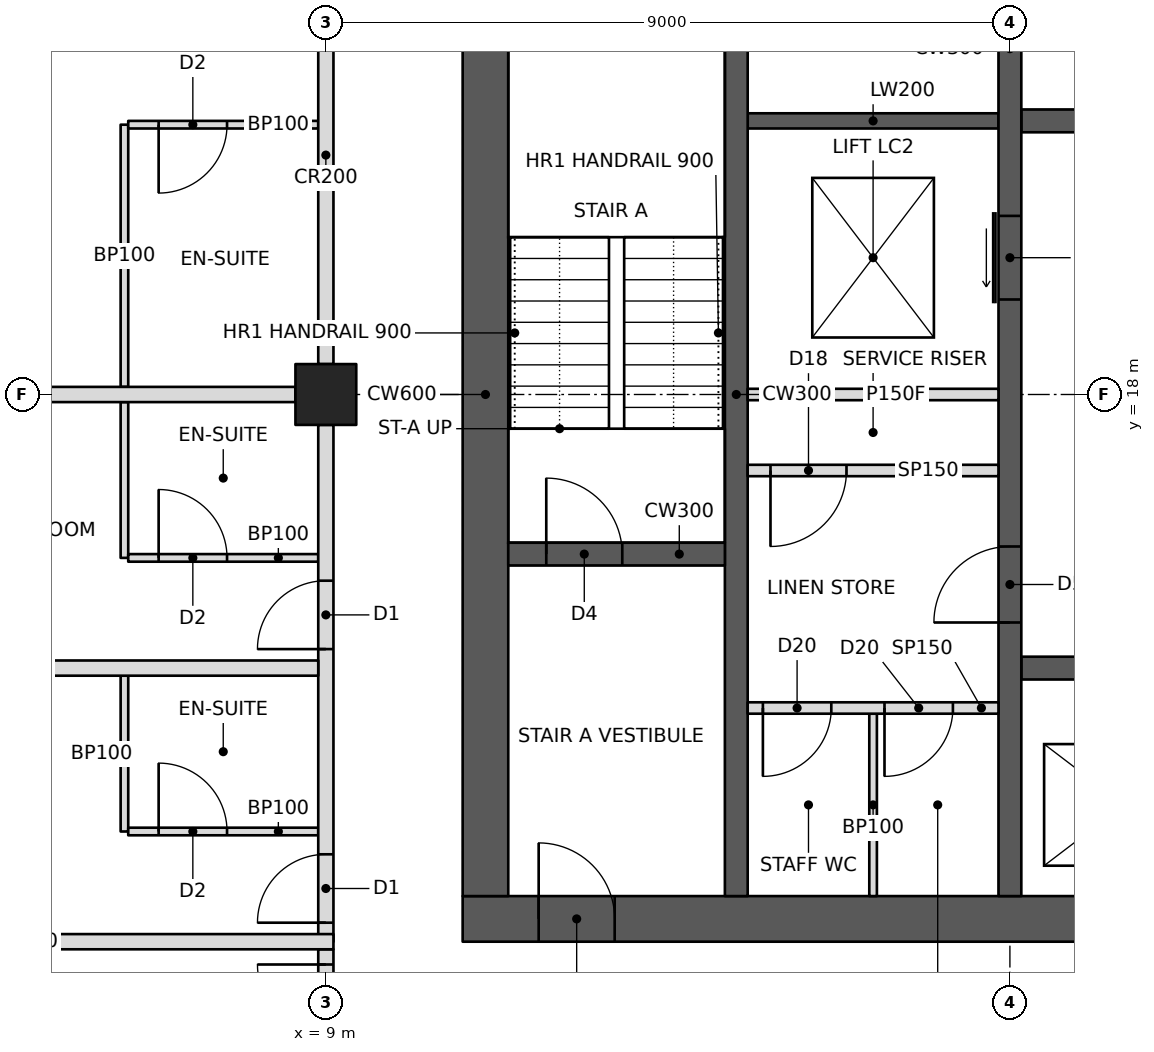
"""IFC4 building model, lengths in metres.
Left out: names, types, materials, properties, quantities, classifications, styles, units other than length and angle.
Written with IfcOpenShell. Run it as: python <this file> out.ifc"""

import sys

from ifc_helpers import new_model, si_unit, direction, frame, frame_2d, origin, origin_2d, place, context, subcontext, project, spatial, rectangle, hollow_rectangle, extrude, element, fill, save


model = new_model("IFC4")
c1 = context("Model", 3, precision=1e-05, world=origin(), true_north=direction((0.0, 1.0)))
c2 = subcontext(c1, "Body", "Model", "MODEL_VIEW")
j1 = project(units=[si_unit("LENGTHUNIT", "METRE"), si_unit("PLANEANGLEUNIT", "RADIAN")], contexts=[c1])
p1 = place(None, origin())
s1 = spatial("IfcSite", under=j1, at=p1, CompositionType="ELEMENT")
p2 = place(p1, origin())
s2 = spatial("IfcBuilding", under=s1, at=p2, CompositionType="ELEMENT")
p3 = place(p2, frame((0.0, 0.0, 170.6)))
s3 = spatial("IfcBuildingStorey", under=s2, at=p3, CompositionType="ELEMENT", Elevation=170.6)
p4 = place(p3, frame((9.0, 18.0, 0.0), z_axis=(0.0, 0.0, 1.0), x_axis=(1.0, 0.0, 0.0)))
e1 = element("IfcColumn", 1, at=p4, inside=s3, PredefinedType="COLUMN", context=c2, shape_type="SweptSolid", body=[
    extrude(hollow_rectangle(XDim=0.8, YDim=0.8, WallThickness=0.06, at=origin_2d()), origin(), (0.0, 0.0, 1.0), 3.4),
])
p5 = place(p3, frame((10.8, 11.1, 0.0), z_axis=(0.0, 0.0, 1.0), x_axis=(1.0, 0.0, 0.0)))
e2 = element("IfcWall", 2, at=p5, inside=s3, PredefinedType="SHEAR", context=c2, shape_type="SweptSolid", body=[
    extrude(rectangle(XDim=23.4, YDim=0.6, at=frame_2d((11.7, 0.0))), origin(), (0.0, 0.0, 1.0), 3.4),
])
p6 = place(p5, frame((1.0, 0.0, 0.0)))
e3 = element("IfcOpeningElement", 3, at=p6, cuts=e2, PredefinedType="OPENING", context=c2, shape_type="SweptSolid", body=[
    extrude(rectangle(XDim=1.0, YDim=2.1, at=frame_2d((0.5, 1.05))), frame((0.0, 0.31, 0.0), z_axis=(0.0, -1.0, 0.0), x_axis=(1.0, 0.0, 0.0)), (0.0, 0.0, 1.0), 0.62),
])
p7 = place(p5, frame((17.2, 0.0, 0.0)))
e4 = element("IfcOpeningElement", 4, at=p7, cuts=e2, PredefinedType="OPENING", context=c2, shape_type="SweptSolid", body=[
    extrude(rectangle(XDim=1.8, YDim=2.1, at=frame_2d((0.9, 1.05))), frame((0.0, 0.31, 0.0), z_axis=(0.0, -1.0, 0.0), x_axis=(1.0, 0.0, 0.0)), (0.0, 0.0, 1.0), 0.62),
])
p8 = place(p3, frame((11.1, 11.4, 0.0), z_axis=(0.0, 0.0, 1.0), x_axis=(0.0, 1.0, 0.0)))
e5 = element("IfcWall", 5, at=p8, inside=s3, PredefinedType="SHEAR", context=c2, shape_type="SweptSolid", body=[
    extrude(rectangle(XDim=13.2, YDim=0.6, at=frame_2d((6.6, 0.0))), origin(), (0.0, 0.0, 1.0), 3.4),
])
p9 = place(p3, frame((14.4, 11.4, 0.0), z_axis=(0.0, 0.0, 1.0), x_axis=(0.0, 1.0, 0.0)))
e6 = element("IfcWall", 6, at=p9, inside=s3, PredefinedType="SHEAR", context=c2, shape_type="SweptSolid", body=[
    extrude(rectangle(XDim=13.2, YDim=0.3, at=frame_2d((6.6, 0.0))), origin(), (0.0, 0.0, 1.0), 3.4),
])
p10 = place(p3, frame((11.4, 15.9, 0.0), z_axis=(0.0, 0.0, 1.0), x_axis=(1.0, 0.0, 0.0)))
e7 = element("IfcWall", 7, at=p10, inside=s3, PredefinedType="SHEAR", context=c2, shape_type="SweptSolid", body=[
    extrude(rectangle(XDim=2.85, YDim=0.3, at=frame_2d((1.425, 0.0))), origin(), (0.0, 0.0, 1.0), 3.4),
])
p11 = place(p10, frame((0.5, 0.0, 0.0)))
e8 = element("IfcOpeningElement", 8, at=p11, cuts=e7, PredefinedType="OPENING", context=c2, shape_type="SweptSolid", body=[
    extrude(rectangle(XDim=1.0, YDim=2.1, at=frame_2d((0.5, 1.05))), frame((0.0, 0.16, 0.0), z_axis=(0.0, -1.0, 0.0), x_axis=(1.0, 0.0, 0.0)), (0.0, 0.0, 1.0), 0.32),
])
p12 = place(p3, frame((18.0, 11.4, 0.0), z_axis=(0.0, 0.0, 1.0), x_axis=(0.0, 1.0, 0.0)))
e9 = element("IfcWall", 9, at=p12, inside=s3, PredefinedType="SHEAR", context=c2, shape_type="SweptSolid", body=[
    extrude(rectangle(XDim=13.2, YDim=0.3, at=frame_2d((6.6, 0.0))), origin(), (0.0, 0.0, 1.0), 3.4),
])
p13 = place(p12, frame((3.6, 0.0, 0.0)))
e10 = element("IfcOpeningElement", 10, at=p13, cuts=e9, PredefinedType="OPENING", context=c2, shape_type="SweptSolid", body=[
    extrude(rectangle(XDim=1.0, YDim=2.1, at=frame_2d((0.5, 1.05))), frame((0.0, 0.16, 0.0), z_axis=(0.0, -1.0, 0.0), x_axis=(1.0, 0.0, 0.0)), (0.0, 0.0, 1.0), 0.32),
])
p14 = place(p12, frame((7.85, 0.0, 0.0)))
e11 = element("IfcOpeningElement", 11, at=p14, cuts=e9, PredefinedType="OPENING", context=c2, shape_type="SweptSolid", body=[
    extrude(rectangle(XDim=1.1, YDim=2.1, at=frame_2d((0.55, 1.05))), frame((0.0, 0.16, 0.0), z_axis=(0.0, -1.0, 0.0), x_axis=(1.0, 0.0, 0.0)), (0.0, 0.0, 1.0), 0.32),
])
p15 = place(p3, frame((14.55, 18.0, 0.0), z_axis=(0.0, 0.0, 1.0), x_axis=(1.0, 0.0, 0.0)))
e12 = element("IfcWall", 12, at=p15, inside=s3, PredefinedType="PARTITIONING", context=c2, shape_type="SweptSolid", body=[
    extrude(rectangle(XDim=3.3, YDim=0.15, at=frame_2d((1.65, 0.0))), origin(), (0.0, 0.0, 1.0), 3.2),
])
p16 = place(p3, frame((18.15, 14.4, 0.0), z_axis=(0.0, 0.0, 1.0), x_axis=(1.0, 0.0, 0.0)))
e13 = element("IfcWall", 13, at=p16, inside=s3, PredefinedType="SHEAR", context=c2, shape_type="SweptSolid", body=[
    extrude(rectangle(XDim=9.0, YDim=0.3, at=frame_2d((4.5, 0.0))), origin(), (0.0, 0.0, 1.0), 3.4),
])
p17 = place(p16, frame((0.8, 0.0, 0.0)))
e14 = element("IfcOpeningElement", 14, at=p17, cuts=e13, PredefinedType="OPENING", context=c2, shape_type="SweptSolid", body=[
    extrude(rectangle(XDim=1.1, YDim=2.1, at=frame_2d((0.55, 1.05))), frame((0.0, 0.16, 0.0), z_axis=(0.0, -1.0, 0.0), x_axis=(1.0, 0.0, 0.0)), (0.0, 0.0, 1.0), 0.32),
])
p18 = place(p16, frame((6.75, 0.0, 0.0)))
e15 = element("IfcOpeningElement", 15, at=p18, cuts=e13, PredefinedType="OPENING", context=c2, shape_type="SweptSolid", body=[
    extrude(rectangle(XDim=1.2, YDim=2.1, at=frame_2d((0.6, 1.05))), frame((0.0, 0.16, 0.0), z_axis=(0.0, -1.0, 0.0), x_axis=(1.0, 0.0, 0.0)), (0.0, 0.0, 1.0), 0.32),
])
p19 = place(p16, frame((3.8, 0.0, 0.0)))
e16 = element("IfcOpeningElement", 16, at=p19, cuts=e13, PredefinedType="OPENING", context=c2, shape_type="SweptSolid", body=[
    extrude(rectangle(XDim=1.1, YDim=2.1, at=frame_2d((0.55, 1.05))), frame((0.0, 0.16, 0.0), z_axis=(0.0, -1.0, 0.0), x_axis=(1.0, 0.0, 0.0)), (0.0, 0.0, 1.0), 0.32),
])
p20 = place(p3, frame((18.15, 21.6, 0.0), z_axis=(0.0, 0.0, 1.0), x_axis=(1.0, 0.0, 0.0)))
e17 = element("IfcWall", 17, at=p20, inside=s3, PredefinedType="SHEAR", context=c2, shape_type="SweptSolid", body=[
    extrude(rectangle(XDim=9.0, YDim=0.3, at=frame_2d((4.5, 0.0))), origin(), (0.0, 0.0, 1.0), 3.4),
])
p21 = place(p20, frame((6.75, 0.0, 0.0)))
e18 = element("IfcOpeningElement", 18, at=p21, cuts=e17, PredefinedType="OPENING", context=c2, shape_type="SweptSolid", body=[
    extrude(rectangle(XDim=1.2, YDim=2.1, at=frame_2d((0.6, 1.05))), frame((0.0, 0.16, 0.0), z_axis=(0.0, -1.0, 0.0), x_axis=(1.0, 0.0, 0.0)), (0.0, 0.0, 1.0), 0.32),
])
p22 = place(p20, frame((0.8, 0.0, 0.0)))
e19 = element("IfcOpeningElement", 19, at=p22, cuts=e17, PredefinedType="OPENING", context=c2, shape_type="SweptSolid", body=[
    extrude(rectangle(XDim=1.1, YDim=2.1, at=frame_2d((0.55, 1.05))), frame((0.0, 0.16, 0.0), z_axis=(0.0, -1.0, 0.0), x_axis=(1.0, 0.0, 0.0)), (0.0, 0.0, 1.0), 0.32),
])
p23 = place(p20, frame((3.8, 0.0, 0.0)))
e20 = element("IfcOpeningElement", 20, at=p23, cuts=e17, PredefinedType="OPENING", context=c2, shape_type="SweptSolid", body=[
    extrude(rectangle(XDim=1.1, YDim=2.1, at=frame_2d((0.55, 1.05))), frame((0.0, 0.16, 0.0), z_axis=(0.0, -1.0, 0.0), x_axis=(1.0, 0.0, 0.0)), (0.0, 0.0, 1.0), 0.32),
])
p24 = place(p3, frame((14.55, 21.6, 0.0), z_axis=(0.0, 0.0, 1.0), x_axis=(1.0, 0.0, 0.0)))
e21 = element("IfcWall", 21, at=p24, inside=s3, PredefinedType="SHEAR", context=c2, shape_type="SweptSolid", body=[
    extrude(rectangle(XDim=3.3, YDim=0.2, at=frame_2d((1.65, 0.0))), origin(), (0.0, 0.0, 1.0), 3.4),
])
p25 = place(p3, frame((9.0, 10.8, 0.0), z_axis=(0.0, 0.0, 1.0), x_axis=(0.0, 1.0, 0.0)))
e22 = element("IfcWall", 22, at=p25, inside=s3, PredefinedType="PARTITIONING", context=c2, shape_type="SweptSolid", body=[
    extrude(rectangle(XDim=6.8, YDim=0.2, at=frame_2d((3.4, 0.0))), origin(), (0.0, 0.0, 1.0), 2.405),
])
p26 = place(p25, frame((0.25, 0.0, 0.0)))
e23 = element("IfcOpeningElement", 23, at=p26, cuts=e22, PredefinedType="OPENING", context=c2, shape_type="SweptSolid", body=[
    extrude(rectangle(XDim=0.9, YDim=2.1, at=frame_2d((0.45, 1.05))), frame((0.0, 0.11, 0.0), z_axis=(0.0, -1.0, 0.0), x_axis=(1.0, 0.0, 0.0)), (0.0, 0.0, 1.0), 0.22),
])
p27 = place(p25, frame((3.85, 0.0, 0.0)))
e24 = element("IfcOpeningElement", 24, at=p27, cuts=e22, PredefinedType="OPENING", context=c2, shape_type="SweptSolid", body=[
    extrude(rectangle(XDim=0.9, YDim=2.1, at=frame_2d((0.45, 1.05))), frame((0.0, 0.11, 0.0), z_axis=(0.0, -1.0, 0.0), x_axis=(1.0, 0.0, 0.0)), (0.0, 0.0, 1.0), 0.22),
])
p28 = place(p3, frame((9.0, 18.4, 0.0), z_axis=(0.0, 0.0, 1.0), x_axis=(0.0, 1.0, 0.0)))
e25 = element("IfcWall", 25, at=p28, inside=s3, PredefinedType="PARTITIONING", context=c2, shape_type="SweptSolid", body=[
    extrude(rectangle(XDim=8.2, YDim=0.2, at=frame_2d((4.1, 0.0))), origin(), (0.0, 0.0, 1.0), 2.405),
])
p29 = place(p28, frame((5.65, 0.0, 0.0)))
e26 = element("IfcOpeningElement", 26, at=p29, cuts=e25, PredefinedType="OPENING", context=c2, shape_type="SweptSolid", body=[
    extrude(rectangle(XDim=0.9, YDim=2.1, at=frame_2d((0.45, 1.05))), frame((0.0, 0.11, 0.0), z_axis=(0.0, -1.0, 0.0), x_axis=(1.0, 0.0, 0.0)), (0.0, 0.0, 1.0), 0.22),
])
p30 = place(p3, frame((1.0, 10.8, 0.0), z_axis=(0.0, 0.0, 1.0), x_axis=(1.0, 0.0, 0.0)))
e27 = element("IfcWall", 27, at=p30, inside=s3, PredefinedType="PARTITIONING", context=c2, shape_type="SweptSolid", body=[
    extrude(rectangle(XDim=8.1, YDim=0.2, at=frame_2d((4.05, 0.0))), origin(), (0.0, 0.0, 1.0), 2.404),
])
p31 = place(p3, frame((8.9, 14.4, 0.0), z_axis=(0.0, 0.0, 1.0), x_axis=(-1.0, 0.0, 0.0)))
e28 = element("IfcWall", 28, at=p31, inside=s3, PredefinedType="PARTITIONING", context=c2, shape_type="SweptSolid", body=[
    extrude(rectangle(XDim=7.9, YDim=0.2, at=frame_2d((3.95, 0.0))), origin(), (0.0, 0.0, 1.0), 2.404),
])
p32 = place(p3, frame((8.6, 18.0, 0.0), z_axis=(0.0, 0.0, 1.0), x_axis=(-1.0, 0.0, 0.0)))
e29 = element("IfcWall", 29, at=p32, inside=s3, PredefinedType="PARTITIONING", context=c2, shape_type="SweptSolid", body=[
    extrude(rectangle(XDim=7.6, YDim=0.2, at=frame_2d((3.8, 0.0))), origin(), (0.0, 0.0, 1.0), 2.405),
])
p33 = place(p3, frame((6.35, 12.25, 0.0), z_axis=(0.0, 0.0, 1.0), x_axis=(0.0, 1.0, 0.0)))
e30 = element("IfcWall", 30, at=p33, inside=s3, PredefinedType="PARTITIONING", context=c2, shape_type="SweptSolid", body=[
    extrude(rectangle(XDim=2.05, YDim=0.1, at=frame_2d((1.025, 0.0))), origin(), (0.0, 0.0, 1.0), 3.2),
])
p34 = place(p3, frame((8.9, 12.25, 0.0), z_axis=(0.0, 0.0, 1.0), x_axis=(-1.0, 0.0, 0.0)))
e31 = element("IfcWall", 31, at=p34, inside=s3, PredefinedType="PARTITIONING", context=c2, shape_type="SweptSolid", body=[
    extrude(rectangle(XDim=2.5, YDim=0.1, at=frame_2d((1.25, 0.0))), origin(), (0.0, 0.0, 1.0), 2.404),
])
p35 = place(p34, frame((1.2, 0.0, 0.0)))
e32 = element("IfcOpeningElement", 32, at=p35, cuts=e31, PredefinedType="OPENING", context=c2, shape_type="SweptSolid", body=[
    extrude(rectangle(XDim=0.9, YDim=2.1, at=frame_2d((0.45, 1.05))), frame((0.0, 0.06, 0.0), z_axis=(0.0, -1.0, 0.0), x_axis=(1.0, 0.0, 0.0)), (0.0, 0.0, 1.0), 0.12),
])
p36 = place(p3, frame((6.35, 15.85, 0.0), z_axis=(0.0, 0.0, 1.0), x_axis=(0.0, 1.0, 0.0)))
e33 = element("IfcWall", 33, at=p36, inside=s3, PredefinedType="PARTITIONING", context=c2, shape_type="SweptSolid", body=[
    extrude(rectangle(XDim=2.05, YDim=0.1, at=frame_2d((1.025, 0.0))), origin(), (0.0, 0.0, 1.0), 2.404),
])
p37 = place(p3, frame((8.9, 15.85, 0.0), z_axis=(0.0, 0.0, 1.0), x_axis=(-1.0, 0.0, 0.0)))
e34 = element("IfcWall", 34, at=p37, inside=s3, PredefinedType="PARTITIONING", context=c2, shape_type="SweptSolid", body=[
    extrude(rectangle(XDim=2.5, YDim=0.1, at=frame_2d((1.25, 0.0))), origin(), (0.0, 0.0, 1.0), 2.404),
])
p38 = place(p37, frame((1.2, 0.0, 0.0)))
e35 = element("IfcOpeningElement", 35, at=p38, cuts=e34, PredefinedType="OPENING", context=c2, shape_type="SweptSolid", body=[
    extrude(rectangle(XDim=0.9, YDim=2.1, at=frame_2d((0.45, 1.05))), frame((0.0, 0.06, 0.0), z_axis=(0.0, -1.0, 0.0), x_axis=(1.0, 0.0, 0.0)), (0.0, 0.0, 1.0), 0.12),
])
p39 = place(p3, frame((6.35, 18.1, 0.0), z_axis=(0.0, 0.0, 1.0), x_axis=(0.0, 1.0, 0.0)))
e36 = element("IfcWall", 36, at=p39, inside=s3, PredefinedType="PARTITIONING", context=c2, shape_type="SweptSolid", body=[
    extrude(rectangle(XDim=3.45, YDim=0.1, at=frame_2d((1.725, 0.0))), origin(), (0.0, 0.0, 1.0), 2.404),
])
p40 = place(p3, frame((8.9, 21.55, 0.0), z_axis=(0.0, 0.0, 1.0), x_axis=(-1.0, 0.0, 0.0)))
e37 = element("IfcWall", 37, at=p40, inside=s3, PredefinedType="PARTITIONING", context=c2, shape_type="SweptSolid", body=[
    extrude(rectangle(XDim=2.5, YDim=0.1, at=frame_2d((1.25, 0.0))), origin(), (0.0, 0.0, 1.0), 2.404),
])
p41 = place(p40, frame((1.2, 0.0, 0.0)))
e38 = element("IfcOpeningElement", 38, at=p41, cuts=e37, PredefinedType="OPENING", context=c2, shape_type="SweptSolid", body=[
    extrude(rectangle(XDim=0.9, YDim=2.1, at=frame_2d((0.45, 1.05))), frame((0.0, 0.06, 0.0), z_axis=(0.0, -1.0, 0.0), x_axis=(1.0, 0.0, 0.0)), (0.0, 0.0, 1.0), 0.12),
])
p42 = place(p3, frame((9.0, 9.4, 0.0), z_axis=(0.0, 0.0, 1.0), x_axis=(0.0, 1.0, 0.0)))
e39 = element("IfcWall", 39, at=p42, inside=s3, PredefinedType="PARTITIONING", context=c2, shape_type="SweptSolid", body=[
    extrude(rectangle(XDim=1.3, YDim=0.2, at=frame_2d((0.65, 0.0))), origin(), (0.0, 0.0, 1.0), 2.405),
])
p43 = place(p42, frame((0.2, 0.0, 0.0)))
e40 = element("IfcOpeningElement", 40, at=p43, cuts=e39, PredefinedType="OPENING", context=c2, shape_type="SweptSolid", body=[
    extrude(rectangle(XDim=0.9, YDim=2.1, at=frame_2d((0.45, 1.05))), frame((0.0, 0.11, 0.0), z_axis=(0.0, -1.0, 0.0), x_axis=(1.0, 0.0, 0.0)), (0.0, 0.0, 1.0), 0.22),
])
p44 = place(p3, frame((14.55, 17.0, 0.0), z_axis=(0.0, 0.0, 1.0), x_axis=(1.0, 0.0, 0.0)))
e41 = element("IfcWall", 41, at=p44, inside=s3, PredefinedType="PARTITIONING", context=c2, shape_type="SweptSolid", body=[
    extrude(rectangle(XDim=3.3, YDim=0.15, at=frame_2d((1.65, 0.0))), origin(), (0.0, 0.0, 1.0), 3.2),
])
p45 = place(p44, frame((0.3, 0.0, 0.0)))
e42 = element("IfcOpeningElement", 42, at=p45, cuts=e41, PredefinedType="OPENING", context=c2, shape_type="SweptSolid", body=[
    extrude(rectangle(XDim=1.0, YDim=2.1, at=frame_2d((0.5, 1.05))), frame((0.0, 0.085, 0.0), z_axis=(0.0, -1.0, 0.0), x_axis=(1.0, 0.0, 0.0)), (0.0, 0.0, 1.0), 0.17),
])
p46 = place(p3, frame((14.55, 13.875, 0.0), z_axis=(0.0, 0.0, 1.0), x_axis=(1.0, 0.0, 0.0)))
e43 = element("IfcWall", 43, at=p46, inside=s3, PredefinedType="PARTITIONING", context=c2, shape_type="SweptSolid", body=[
    extrude(rectangle(XDim=3.3, YDim=0.15, at=frame_2d((1.65, 0.0))), origin(), (0.0, 0.0, 1.0), 3.2),
])
p47 = place(p46, frame((0.2, 0.0, 0.0)))
e44 = element("IfcOpeningElement", 44, at=p47, cuts=e43, PredefinedType="OPENING", context=c2, shape_type="SweptSolid", body=[
    extrude(rectangle(XDim=0.9, YDim=2.1, at=frame_2d((0.45, 1.05))), frame((0.0, 0.085, 0.0), z_axis=(0.0, -1.0, 0.0), x_axis=(1.0, 0.0, 0.0)), (0.0, 0.0, 1.0), 0.17),
])
p48 = place(p46, frame((1.8, 0.0, 0.0)))
e45 = element("IfcOpeningElement", 45, at=p48, cuts=e43, PredefinedType="OPENING", context=c2, shape_type="SweptSolid", body=[
    extrude(rectangle(XDim=0.9, YDim=2.1, at=frame_2d((0.45, 1.05))), frame((0.0, 0.085, 0.0), z_axis=(0.0, -1.0, 0.0), x_axis=(1.0, 0.0, 0.0)), (0.0, 0.0, 1.0), 0.17),
])
p49 = place(p3, frame((16.2, 11.4, 0.0), z_axis=(0.0, 0.0, 1.0), x_axis=(0.0, 1.0, 0.0)))
e46 = element("IfcWall", 46, at=p49, inside=s3, PredefinedType="PARTITIONING", context=c2, shape_type="SweptSolid", body=[
    extrude(rectangle(XDim=2.4, YDim=0.1, at=frame_2d((1.2, 0.0))), origin(), (0.0, 0.0, 1.0), 3.2),
])
p50 = place(p35, frame((0.9, 0.0, 0.0), z_axis=(0.0, 0.0, 1.0), x_axis=(-1.0, 0.0, 0.0)))
e47 = element("IfcDoor", 47, at=p50, inside=s3, OperationType="SINGLE_SWING_LEFT", PredefinedType="DOOR", context=c2, shape_type="SweptSolid", body=[
    extrude(rectangle(XDim=0.9, YDim=2.1, at=frame_2d((0.45, 1.05))), frame((0.0, 0.025, 0.0), z_axis=(0.0, -1.0, 0.0), x_axis=(1.0, 0.0, 0.0)), (0.0, 0.0, 1.0), 0.05),
])
fill(e32, e47)
p51 = place(p26, origin())
e48 = element("IfcDoor", 48, at=p51, inside=s3, OperationType="SINGLE_SWING_LEFT", PredefinedType="DOOR", context=c2, shape_type="SweptSolid", body=[
    extrude(rectangle(XDim=0.9, YDim=2.1, at=frame_2d((0.45, 1.05))), frame((0.0, 0.025, 0.0), z_axis=(0.0, -1.0, 0.0), x_axis=(1.0, 0.0, 0.0)), (0.0, 0.0, 1.0), 0.05),
])
fill(e23, e48)
p52 = place(p38, frame((0.9, 0.0, 0.0), z_axis=(0.0, 0.0, 1.0), x_axis=(-1.0, 0.0, 0.0)))
e49 = element("IfcDoor", 49, at=p52, inside=s3, OperationType="SINGLE_SWING_LEFT", PredefinedType="DOOR", context=c2, shape_type="SweptSolid", body=[
    extrude(rectangle(XDim=0.9, YDim=2.1, at=frame_2d((0.45, 1.05))), frame((0.0, 0.025, 0.0), z_axis=(0.0, -1.0, 0.0), x_axis=(1.0, 0.0, 0.0)), (0.0, 0.0, 1.0), 0.05),
])
fill(e35, e49)
p53 = place(p27, origin())
e50 = element("IfcDoor", 50, at=p53, inside=s3, OperationType="SINGLE_SWING_LEFT", PredefinedType="DOOR", context=c2, shape_type="SweptSolid", body=[
    extrude(rectangle(XDim=0.9, YDim=2.1, at=frame_2d((0.45, 1.05))), frame((0.0, 0.025, 0.0), z_axis=(0.0, -1.0, 0.0), x_axis=(1.0, 0.0, 0.0)), (0.0, 0.0, 1.0), 0.05),
])
fill(e24, e50)
p54 = place(p41, origin())
e51 = element("IfcDoor", 51, at=p54, inside=s3, OperationType="SINGLE_SWING_RIGHT", PredefinedType="DOOR", context=c2, shape_type="SweptSolid", body=[
    extrude(rectangle(XDim=0.9, YDim=2.1, at=frame_2d((0.45, 1.05))), frame((0.0, 0.025, 0.0), z_axis=(0.0, -1.0, 0.0), x_axis=(1.0, 0.0, 0.0)), (0.0, 0.0, 1.0), 0.05),
])
fill(e38, e51)
p55 = place(p43, origin())
e52 = element("IfcDoor", 52, at=p55, inside=s3, OperationType="SINGLE_SWING_RIGHT", PredefinedType="DOOR", context=c2, shape_type="SweptSolid", body=[
    extrude(rectangle(XDim=0.9, YDim=2.1, at=frame_2d((0.45, 1.05))), frame((0.0, 0.025, 0.0), z_axis=(0.0, -1.0, 0.0), x_axis=(1.0, 0.0, 0.0)), (0.0, 0.0, 1.0), 0.05),
])
fill(e40, e52)
p56 = place(p45, frame((1.0, 0.0, 0.0), z_axis=(0.0, 0.0, 1.0), x_axis=(-1.0, 0.0, 0.0)))
e53 = element("IfcDoor", 53, at=p56, inside=s3, OperationType="SINGLE_SWING_RIGHT", PredefinedType="DOOR", context=c2, shape_type="SweptSolid", body=[
    extrude(rectangle(XDim=1.0, YDim=2.1, at=frame_2d((0.5, 1.05))), frame((0.0, 0.025, 0.0), z_axis=(0.0, -1.0, 0.0), x_axis=(1.0, 0.0, 0.0)), (0.0, 0.0, 1.0), 0.05),
])
fill(e42, e53)
p57 = place(p47, frame((0.9, 0.0, 0.0), z_axis=(0.0, 0.0, 1.0), x_axis=(-1.0, 0.0, 0.0)))
e54 = element("IfcDoor", 54, at=p57, inside=s3, OperationType="SINGLE_SWING_RIGHT", PredefinedType="DOOR", context=c2, shape_type="SweptSolid", body=[
    extrude(rectangle(XDim=0.9, YDim=2.1, at=frame_2d((0.45, 1.05))), frame((0.0, 0.025, 0.0), z_axis=(0.0, -1.0, 0.0), x_axis=(1.0, 0.0, 0.0)), (0.0, 0.0, 1.0), 0.05),
])
fill(e44, e54)
p58 = place(p48, frame((0.9, 0.0, 0.0), z_axis=(0.0, 0.0, 1.0), x_axis=(-1.0, 0.0, 0.0)))
e55 = element("IfcDoor", 55, at=p58, inside=s3, OperationType="SINGLE_SWING_RIGHT", PredefinedType="DOOR", context=c2, shape_type="SweptSolid", body=[
    extrude(rectangle(XDim=0.9, YDim=2.1, at=frame_2d((0.45, 1.05))), frame((0.0, 0.025, 0.0), z_axis=(0.0, -1.0, 0.0), x_axis=(1.0, 0.0, 0.0)), (0.0, 0.0, 1.0), 0.05),
])
fill(e45, e55)
p59 = place(p6, origin())
e56 = element("IfcDoor", 56, at=p59, inside=s3, OperationType="SINGLE_SWING_LEFT", PredefinedType="DOOR", context=c2, shape_type="SweptSolid", body=[
    extrude(rectangle(XDim=1.0, YDim=2.1, at=frame_2d((0.5, 1.05))), frame((0.0, 0.025, 0.0), z_axis=(0.0, -1.0, 0.0), x_axis=(1.0, 0.0, 0.0)), (0.0, 0.0, 1.0), 0.05),
])
fill(e3, e56)
p60 = place(p11, origin())
e57 = element("IfcDoor", 57, at=p60, inside=s3, OperationType="SINGLE_SWING_LEFT", PredefinedType="DOOR", context=c2, shape_type="SweptSolid", body=[
    extrude(rectangle(XDim=1.0, YDim=2.1, at=frame_2d((0.5, 1.05))), frame((0.0, 0.025, 0.0), z_axis=(0.0, -1.0, 0.0), x_axis=(1.0, 0.0, 0.0)), (0.0, 0.0, 1.0), 0.05),
])
fill(e8, e57)
p61 = place(p13, origin())
e58 = element("IfcDoor", 58, at=p61, inside=s3, OperationType="SINGLE_SWING_LEFT", PredefinedType="DOOR", context=c2, shape_type="SweptSolid", body=[
    extrude(rectangle(XDim=1.0, YDim=2.1, at=frame_2d((0.5, 1.05))), frame((0.0, 0.025, 0.0), z_axis=(0.0, -1.0, 0.0), x_axis=(1.0, 0.0, 0.0)), (0.0, 0.0, 1.0), 0.05),
])
fill(e10, e58)
p62 = place(p14, origin())
e59 = element("IfcDoor", 59, at=p62, inside=s3, OperationType="SLIDING_TO_LEFT", PredefinedType="DOOR", context=c2, shape_type="SweptSolid", body=[
    extrude(rectangle(XDim=1.1, YDim=2.1, at=frame_2d((0.55, 1.05))), frame((0.0, 0.025, 0.0), z_axis=(0.0, -1.0, 0.0), x_axis=(1.0, 0.0, 0.0)), (0.0, 0.0, 1.0), 0.05),
])
fill(e11, e59)
save(model, sys.argv[1])
